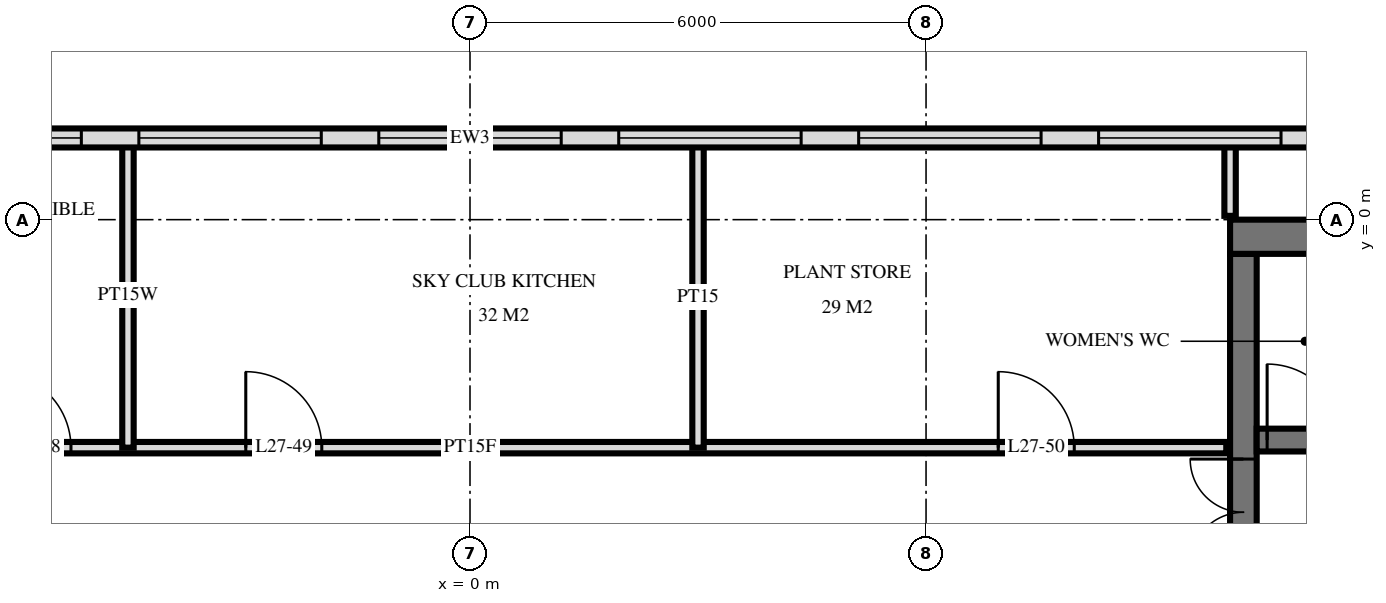
"""IFC4 building model, lengths in metres.
Left out: names, types, materials, properties, quantities, classifications, styles, units other than length and angle.
Written with IfcOpenShell. Run it as: python <this file> out.ifc"""

import sys

from ifc_helpers import new_model, si_unit, direction, frame, frame_2d, origin, place, context, subcontext, project, spatial, rectangle, extrude, element, fill, save


model = new_model("IFC4")
c1 = context("Model", 3, precision=1e-05, world=origin(), true_north=direction((0.0, 1.0)))
c2 = subcontext(c1, "Body", "Model", "MODEL_VIEW")
j1 = project(units=[si_unit("LENGTHUNIT", "METRE"), si_unit("PLANEANGLEUNIT", "RADIAN")], contexts=[c1])
p1 = place(None, origin())
s1 = spatial("IfcSite", under=j1, at=p1, CompositionType="ELEMENT")
p2 = place(p1, origin())
s2 = spatial("IfcBuilding", under=s1, at=p2, CompositionType="ELEMENT")
p3 = place(p2, frame((0.0, 0.0, 106.8)))
s3 = spatial("IfcBuildingStorey", under=s2, at=p3, CompositionType="ELEMENT", Elevation=106.8)
p4 = place(p3, frame((10.0, -0.225, 0.0), z_axis=(0.0, 0.0, 1.0), x_axis=(1.0, 0.0, 0.0)))
e1 = element("IfcWall", 1, at=p4, inside=s3, PredefinedType="SHEAR", context=c2, shape_type="SweptSolid", body=[
    extrude(rectangle(XDim=14.5, YDim=0.45, at=frame_2d((7.25, 0.0))), origin(), (0.0, 0.0, 1.0), 6.0),
])
p5 = place(p3, frame((10.175, -14.55, 0.0), z_axis=(0.0, 0.0, 1.0), x_axis=(0.0, 1.0, 0.0)))
e2 = element("IfcWall", 2, at=p5, inside=s3, PredefinedType="SHEAR", context=c2, shape_type="SweptSolid", body=[
    extrude(rectangle(XDim=14.1, YDim=0.35, at=frame_2d((7.05, 0.0))), origin(), (0.0, 0.0, 1.0), 6.0),
])
p6 = place(p5, frame((8.4, 0.0, 0.0)))
e3 = element("IfcOpeningElement", 3, at=p6, cuts=e2, PredefinedType="OPENING", context=c2, shape_type="SweptSolid", body=[
    extrude(rectangle(XDim=1.4, YDim=2.4, at=frame_2d((0.7, 1.2))), frame((0.0, 0.185, 0.0), z_axis=(0.0, -1.0, 0.0), x_axis=(1.0, 0.0, 0.0)), (0.0, 0.0, 1.0), 0.37),
])
p7 = place(p5, frame((10.0, 0.0, 0.0)))
e4 = element("IfcOpeningElement", 4, at=p7, cuts=e2, PredefinedType="OPENING", context=c2, shape_type="SweptSolid", body=[
    extrude(rectangle(XDim=1.4, YDim=2.4, at=frame_2d((0.7, 1.2))), frame((0.0, 0.185, 0.0), z_axis=(0.0, -1.0, 0.0), x_axis=(1.0, 0.0, 0.0)), (0.0, 0.0, 1.0), 0.37),
])
p8 = place(p5, frame((4.0, 0.0, 0.0)))
e5 = element("IfcOpeningElement", 5, at=p8, cuts=e2, PredefinedType="OPENING", context=c2, shape_type="SweptSolid", body=[
    extrude(rectangle(XDim=1.2, YDim=2.1, at=frame_2d((0.6, 1.05))), frame((0.0, 0.185, 0.0), z_axis=(0.0, -1.0, 0.0), x_axis=(1.0, 0.0, 0.0)), (0.0, 0.0, 1.0), 0.37),
])
p9 = place(p3, frame((10.35, -2.9, 0.0), z_axis=(0.0, 0.0, 1.0), x_axis=(1.0, 0.0, 0.0)))
e6 = element("IfcWall", 6, at=p9, inside=s3, PredefinedType="SHEAR", context=c2, shape_type="SweptSolid", body=[
    extrude(rectangle(XDim=13.7, YDim=0.3, at=frame_2d((6.85, 0.0))), origin(), (0.0, 0.0, 1.0), 6.0),
])
p10 = place(p9, frame((9.65, 0.0, 0.0)))
e7 = element("IfcOpeningElement", 7, at=p10, cuts=e6, PredefinedType="OPENING", context=c2, shape_type="SweptSolid", body=[
    extrude(rectangle(XDim=1.1, YDim=2.1, at=frame_2d((0.55, 1.05))), frame((0.0, 0.16, 0.0), z_axis=(0.0, -1.0, 0.0), x_axis=(1.0, 0.0, 0.0)), (0.0, 0.0, 1.0), 0.32),
])
p11 = place(p9, frame((12.05, 0.0, 0.0)))
e8 = element("IfcOpeningElement", 8, at=p11, cuts=e6, PredefinedType="OPENING", context=c2, shape_type="SweptSolid", body=[
    extrude(rectangle(XDim=1.1, YDim=2.1, at=frame_2d((0.55, 1.05))), frame((0.0, 0.16, 0.0), z_axis=(0.0, -1.0, 0.0), x_axis=(1.0, 0.0, 0.0)), (0.0, 0.0, 1.0), 0.32),
])
p12 = place(p9, frame((6.188, 0.0, 0.0)))
e9 = element("IfcOpeningElement", 9, at=p12, cuts=e6, PredefinedType="OPENING", context=c2, shape_type="SweptSolid", body=[
    extrude(rectangle(XDim=0.9, YDim=2.1, at=frame_2d((0.45, 1.05))), frame((0.0, 0.16, 0.0), z_axis=(0.0, -1.0, 0.0), x_axis=(1.0, 0.0, 0.0)), (0.0, 0.0, 1.0), 0.32),
])
p13 = place(p9, frame((7.613, 0.0, 0.0)))
e10 = element("IfcOpeningElement", 10, at=p13, cuts=e6, PredefinedType="OPENING", context=c2, shape_type="SweptSolid", body=[
    extrude(rectangle(XDim=0.9, YDim=2.1, at=frame_2d((0.45, 1.05))), frame((0.0, 0.16, 0.0), z_axis=(0.0, -1.0, 0.0), x_axis=(1.0, 0.0, 0.0)), (0.0, 0.0, 1.0), 0.32),
])
p14 = place(p9, frame((0.137, 0.0, 0.0)))
e11 = element("IfcOpeningElement", 11, at=p14, cuts=e6, PredefinedType="OPENING", context=c2, shape_type="SweptSolid", body=[
    extrude(rectangle(XDim=1.0, YDim=2.1, at=frame_2d((0.5, 1.05))), frame((0.0, 0.16, 0.0), z_axis=(0.0, -1.0, 0.0), x_axis=(1.0, 0.0, 0.0)), (0.0, 0.0, 1.0), 0.32),
])
p15 = place(p9, frame((1.562, 0.0, 0.0)))
e12 = element("IfcOpeningElement", 12, at=p15, cuts=e6, PredefinedType="OPENING", context=c2, shape_type="SweptSolid", body=[
    extrude(rectangle(XDim=1.0, YDim=2.1, at=frame_2d((0.5, 1.05))), frame((0.0, 0.16, 0.0), z_axis=(0.0, -1.0, 0.0), x_axis=(1.0, 0.0, 0.0)), (0.0, 0.0, 1.0), 0.32),
])
p16 = place(p9, frame((3.85, 0.0, 0.0)))
e13 = element("IfcOpeningElement", 13, at=p16, cuts=e6, PredefinedType="OPENING", context=c2, shape_type="SweptSolid", body=[
    extrude(rectangle(XDim=1.0, YDim=2.1, at=frame_2d((0.5, 1.05))), frame((0.0, 0.16, 0.0), z_axis=(0.0, -1.0, 0.0), x_axis=(1.0, 0.0, 0.0)), (0.0, 0.0, 1.0), 0.32),
])
p17 = place(p3, frame((23.675, 1.075, 0.0), z_axis=(0.0, 0.0, 1.0), x_axis=(-1.0, 0.0, 0.0)))
e14 = element("IfcWall", 14, at=p17, inside=s3, PredefinedType="SOLIDWALL", context=c2, shape_type="SweptSolid", body=[
    extrude(rectangle(XDim=47.351, YDim=0.25, at=frame_2d((23.675, 0.0))), origin(), (0.0, 0.0, 1.0), 5.72),
])
p18 = place(p17, frame((0.378, 0.0, 0.858)))
e15 = element("IfcOpeningElement", 15, at=p18, cuts=e14, PredefinedType="OPENING", context=c2, shape_type="SweptSolid", body=[
    extrude(rectangle(XDim=2.4, YDim=3.6, at=frame_2d((1.2, 1.8))), frame((0.0, 0.135, 0.0), z_axis=(0.0, -1.0, 0.0), x_axis=(1.0, 0.0, 0.0)), (0.0, 0.0, 1.0), 0.27),
])
p19 = place(p17, frame((3.535, 0.0, 0.858)))
e16 = element("IfcOpeningElement", 16, at=p19, cuts=e14, PredefinedType="OPENING", context=c2, shape_type="SweptSolid", body=[
    extrude(rectangle(XDim=2.4, YDim=3.6, at=frame_2d((1.2, 1.8))), frame((0.0, 0.135, 0.0), z_axis=(0.0, -1.0, 0.0), x_axis=(1.0, 0.0, 0.0)), (0.0, 0.0, 1.0), 0.27),
])
p20 = place(p17, frame((6.692, 0.0, 0.858)))
e17 = element("IfcOpeningElement", 17, at=p20, cuts=e14, PredefinedType="OPENING", context=c2, shape_type="SweptSolid", body=[
    extrude(rectangle(XDim=2.4, YDim=3.6, at=frame_2d((1.2, 1.8))), frame((0.0, 0.135, 0.0), z_axis=(0.0, -1.0, 0.0), x_axis=(1.0, 0.0, 0.0)), (0.0, 0.0, 1.0), 0.27),
])
p21 = place(p17, frame((9.848, 0.0, 0.858)))
e18 = element("IfcOpeningElement", 18, at=p21, cuts=e14, PredefinedType="OPENING", context=c2, shape_type="SweptSolid", body=[
    extrude(rectangle(XDim=2.4, YDim=3.6, at=frame_2d((1.2, 1.8))), frame((0.0, 0.135, 0.0), z_axis=(0.0, -1.0, 0.0), x_axis=(1.0, 0.0, 0.0)), (0.0, 0.0, 1.0), 0.27),
])
p22 = place(p17, frame((13.005, 0.0, 0.858)))
e19 = element("IfcOpeningElement", 19, at=p22, cuts=e14, PredefinedType="OPENING", context=c2, shape_type="SweptSolid", body=[
    extrude(rectangle(XDim=2.4, YDim=3.6, at=frame_2d((1.2, 1.8))), frame((0.0, 0.135, 0.0), z_axis=(0.0, -1.0, 0.0), x_axis=(1.0, 0.0, 0.0)), (0.0, 0.0, 1.0), 0.27),
])
p23 = place(p17, frame((16.162, 0.0, 0.858)))
e20 = element("IfcOpeningElement", 20, at=p23, cuts=e14, PredefinedType="OPENING", context=c2, shape_type="SweptSolid", body=[
    extrude(rectangle(XDim=2.4, YDim=3.6, at=frame_2d((1.2, 1.8))), frame((0.0, 0.135, 0.0), z_axis=(0.0, -1.0, 0.0), x_axis=(1.0, 0.0, 0.0)), (0.0, 0.0, 1.0), 0.27),
])
p24 = place(p17, frame((19.319, 0.0, 0.858)))
e21 = element("IfcOpeningElement", 21, at=p24, cuts=e14, PredefinedType="OPENING", context=c2, shape_type="SweptSolid", body=[
    extrude(rectangle(XDim=2.4, YDim=3.6, at=frame_2d((1.2, 1.8))), frame((0.0, 0.135, 0.0), z_axis=(0.0, -1.0, 0.0), x_axis=(1.0, 0.0, 0.0)), (0.0, 0.0, 1.0), 0.27),
])
p25 = place(p17, frame((22.475, 0.0, 0.858)))
e22 = element("IfcOpeningElement", 22, at=p25, cuts=e14, PredefinedType="OPENING", context=c2, shape_type="SweptSolid", body=[
    extrude(rectangle(XDim=2.4, YDim=3.6, at=frame_2d((1.2, 1.8))), frame((0.0, 0.135, 0.0), z_axis=(0.0, -1.0, 0.0), x_axis=(1.0, 0.0, 0.0)), (0.0, 0.0, 1.0), 0.27),
])
p26 = place(p17, frame((25.632, 0.0, 0.858)))
e23 = element("IfcOpeningElement", 23, at=p26, cuts=e14, PredefinedType="OPENING", context=c2, shape_type="SweptSolid", body=[
    extrude(rectangle(XDim=2.4, YDim=3.6, at=frame_2d((1.2, 1.8))), frame((0.0, 0.135, 0.0), z_axis=(0.0, -1.0, 0.0), x_axis=(1.0, 0.0, 0.0)), (0.0, 0.0, 1.0), 0.27),
])
p27 = place(p17, frame((28.789, 0.0, 0.858)))
e24 = element("IfcOpeningElement", 24, at=p27, cuts=e14, PredefinedType="OPENING", context=c2, shape_type="SweptSolid", body=[
    extrude(rectangle(XDim=2.4, YDim=3.6, at=frame_2d((1.2, 1.8))), frame((0.0, 0.135, 0.0), z_axis=(0.0, -1.0, 0.0), x_axis=(1.0, 0.0, 0.0)), (0.0, 0.0, 1.0), 0.27),
])
p28 = place(p17, frame((31.946, 0.0, 0.858)))
e25 = element("IfcOpeningElement", 25, at=p28, cuts=e14, PredefinedType="OPENING", context=c2, shape_type="SweptSolid", body=[
    extrude(rectangle(XDim=2.4, YDim=3.6, at=frame_2d((1.2, 1.8))), frame((0.0, 0.135, 0.0), z_axis=(0.0, -1.0, 0.0), x_axis=(1.0, 0.0, 0.0)), (0.0, 0.0, 1.0), 0.27),
])
p29 = place(p17, frame((35.102, 0.0, 0.858)))
e26 = element("IfcOpeningElement", 26, at=p29, cuts=e14, PredefinedType="OPENING", context=c2, shape_type="SweptSolid", body=[
    extrude(rectangle(XDim=2.4, YDim=3.6, at=frame_2d((1.2, 1.8))), frame((0.0, 0.135, 0.0), z_axis=(0.0, -1.0, 0.0), x_axis=(1.0, 0.0, 0.0)), (0.0, 0.0, 1.0), 0.27),
])
p30 = place(p17, frame((38.259, 0.0, 0.858)))
e27 = element("IfcOpeningElement", 27, at=p30, cuts=e14, PredefinedType="OPENING", context=c2, shape_type="SweptSolid", body=[
    extrude(rectangle(XDim=2.4, YDim=3.6, at=frame_2d((1.2, 1.8))), frame((0.0, 0.135, 0.0), z_axis=(0.0, -1.0, 0.0), x_axis=(1.0, 0.0, 0.0)), (0.0, 0.0, 1.0), 0.27),
])
p31 = place(p17, frame((41.416, 0.0, 0.858)))
e28 = element("IfcOpeningElement", 28, at=p31, cuts=e14, PredefinedType="OPENING", context=c2, shape_type="SweptSolid", body=[
    extrude(rectangle(XDim=2.4, YDim=3.6, at=frame_2d((1.2, 1.8))), frame((0.0, 0.135, 0.0), z_axis=(0.0, -1.0, 0.0), x_axis=(1.0, 0.0, 0.0)), (0.0, 0.0, 1.0), 0.27),
])
p32 = place(p17, frame((44.573, 0.0, 0.858)))
e29 = element("IfcOpeningElement", 29, at=p32, cuts=e14, PredefinedType="OPENING", context=c2, shape_type="SweptSolid", body=[
    extrude(rectangle(XDim=2.4, YDim=3.6, at=frame_2d((1.2, 1.8))), frame((0.0, 0.135, 0.0), z_axis=(0.0, -1.0, 0.0), x_axis=(1.0, 0.0, 0.0)), (0.0, 0.0, 1.0), 0.27),
])
p33 = place(p3, frame((10.0, 0.05, 0.0), z_axis=(0.0, 0.0, 1.0), x_axis=(0.0, 1.0, 0.0)))
e30 = element("IfcWall", 30, at=p33, inside=s3, PredefinedType="PARTITIONING", context=c2, shape_type="SweptSolid", body=[
    extrude(rectangle(XDim=0.91, YDim=0.15, at=frame_2d((0.455, 0.0))), origin(), (0.0, 0.0, 1.0), 5.7),
])
p34 = place(p3, frame((3.0, -3.0, 0.0), z_axis=(0.0, 0.0, 1.0), x_axis=(0.0, 1.0, 0.0)))
e31 = element("IfcWall", 31, at=p34, inside=s3, PredefinedType="PARTITIONING", context=c2, shape_type="SweptSolid", body=[
    extrude(rectangle(XDim=3.96, YDim=0.15, at=frame_2d((1.98, 0.0))), origin(), (0.0, 0.0, 1.0), 5.7),
])
p35 = place(p3, frame((-4.5, -3.0, 0.0), z_axis=(0.0, 0.0, 1.0), x_axis=(0.0, 1.0, 0.0)))
e32 = element("IfcWall", 32, at=p35, inside=s3, PredefinedType="PLUMBINGWALL", context=c2, shape_type="SweptSolid", body=[
    extrude(rectangle(XDim=4.02, YDim=0.15, at=frame_2d((2.01, 0.0))), origin(), (0.0, 0.0, 1.0), 5.7),
])
p36 = place(p3, frame((-9.95, -3.0, 0.0), z_axis=(0.0, 0.0, 1.0), x_axis=(1.0, 0.0, 0.0)))
e33 = element("IfcWall", 33, at=p36, inside=s3, PredefinedType="PARTITIONING", context=c2, shape_type="SweptSolid", body=[
    extrude(rectangle(XDim=19.9, YDim=0.15, at=frame_2d((9.95, 0.0))), origin(), (0.0, 0.0, 1.0), 5.7),
])
p37 = place(p36, frame((0.95, 0.0, 0.0)))
e34 = element("IfcOpeningElement", 34, at=p37, cuts=e33, PredefinedType="OPENING", context=c2, shape_type="SweptSolid", body=[
    extrude(rectangle(XDim=1.0, YDim=2.1, at=frame_2d((0.5, 1.05))), frame((0.0, 0.085, 0.0), z_axis=(0.0, -1.0, 0.0), x_axis=(1.0, 0.0, 0.0)), (0.0, 0.0, 1.0), 0.17),
])
p38 = place(p36, frame((3.7, 0.0, 0.0)))
e35 = element("IfcOpeningElement", 35, at=p38, cuts=e33, PredefinedType="OPENING", context=c2, shape_type="SweptSolid", body=[
    extrude(rectangle(XDim=1.0, YDim=2.1, at=frame_2d((0.5, 1.05))), frame((0.0, 0.085, 0.0), z_axis=(0.0, -1.0, 0.0), x_axis=(1.0, 0.0, 0.0)), (0.0, 0.0, 1.0), 0.17),
])
p39 = place(p36, frame((7.0, 0.0, 0.0)))
e36 = element("IfcOpeningElement", 36, at=p39, cuts=e33, PredefinedType="OPENING", context=c2, shape_type="SweptSolid", body=[
    extrude(rectangle(XDim=1.0, YDim=2.1, at=frame_2d((0.5, 1.05))), frame((0.0, 0.085, 0.0), z_axis=(0.0, -1.0, 0.0), x_axis=(1.0, 0.0, 0.0)), (0.0, 0.0, 1.0), 0.17),
])
p40 = place(p36, frame((16.9, 0.0, 0.0)))
e37 = element("IfcOpeningElement", 37, at=p40, cuts=e33, PredefinedType="OPENING", context=c2, shape_type="SweptSolid", body=[
    extrude(rectangle(XDim=1.0, YDim=2.1, at=frame_2d((0.5, 1.05))), frame((0.0, 0.085, 0.0), z_axis=(0.0, -1.0, 0.0), x_axis=(1.0, 0.0, 0.0)), (0.0, 0.0, 1.0), 0.17),
])
p41 = place(p22, origin())
e38 = element("IfcWindow", 38, at=p41, inside=s3, PartitioningType="SINGLE_PANEL", PredefinedType="USERDEFINED", context=c2, shape_type="SweptSolid", body=[
    extrude(rectangle(XDim=2.4, YDim=3.6, at=frame_2d((1.2, 1.8))), frame((0.0, 0.03, 0.0), z_axis=(0.0, -1.0, 0.0), x_axis=(1.0, 0.0, 0.0)), (0.0, 0.0, 1.0), 0.06),
])
fill(e19, e38)
p42 = place(p23, origin())
e39 = element("IfcWindow", 39, at=p42, inside=s3, PartitioningType="SINGLE_PANEL", PredefinedType="USERDEFINED", context=c2, shape_type="SweptSolid", body=[
    extrude(rectangle(XDim=2.4, YDim=3.6, at=frame_2d((1.2, 1.8))), frame((0.0, 0.03, 0.0), z_axis=(0.0, -1.0, 0.0), x_axis=(1.0, 0.0, 0.0)), (0.0, 0.0, 1.0), 0.06),
])
fill(e20, e39)
p43 = place(p24, origin())
e40 = element("IfcWindow", 40, at=p43, inside=s3, PartitioningType="SINGLE_PANEL", PredefinedType="USERDEFINED", context=c2, shape_type="SweptSolid", body=[
    extrude(rectangle(XDim=2.4, YDim=3.6, at=frame_2d((1.2, 1.8))), frame((0.0, 0.03, 0.0), z_axis=(0.0, -1.0, 0.0), x_axis=(1.0, 0.0, 0.0)), (0.0, 0.0, 1.0), 0.06),
])
fill(e21, e40)
p44 = place(p25, origin())
e41 = element("IfcWindow", 41, at=p44, inside=s3, PartitioningType="SINGLE_PANEL", PredefinedType="USERDEFINED", context=c2, shape_type="SweptSolid", body=[
    extrude(rectangle(XDim=2.4, YDim=3.6, at=frame_2d((1.2, 1.8))), frame((0.0, 0.03, 0.0), z_axis=(0.0, -1.0, 0.0), x_axis=(1.0, 0.0, 0.0)), (0.0, 0.0, 1.0), 0.06),
])
fill(e22, e41)
p45 = place(p26, origin())
e42 = element("IfcWindow", 42, at=p45, inside=s3, PartitioningType="SINGLE_PANEL", PredefinedType="USERDEFINED", context=c2, shape_type="SweptSolid", body=[
    extrude(rectangle(XDim=2.4, YDim=3.6, at=frame_2d((1.2, 1.8))), frame((0.0, 0.03, 0.0), z_axis=(0.0, -1.0, 0.0), x_axis=(1.0, 0.0, 0.0)), (0.0, 0.0, 1.0), 0.06),
])
fill(e23, e42)
p46 = place(p27, origin())
e43 = element("IfcWindow", 43, at=p46, inside=s3, PartitioningType="SINGLE_PANEL", PredefinedType="USERDEFINED", context=c2, shape_type="SweptSolid", body=[
    extrude(rectangle(XDim=2.4, YDim=3.6, at=frame_2d((1.2, 1.8))), frame((0.0, 0.03, 0.0), z_axis=(0.0, -1.0, 0.0), x_axis=(1.0, 0.0, 0.0)), (0.0, 0.0, 1.0), 0.06),
])
fill(e24, e43)
p47 = place(p7, origin())
e44 = element("IfcDoor", 44, at=p47, inside=s3, OperationType="DOUBLE_DOOR_SINGLE_SWING", PredefinedType="DOOR", context=c2, shape_type="SweptSolid", body=[
    extrude(rectangle(XDim=1.4, YDim=2.4, at=frame_2d((0.7, 1.2))), frame((0.0, 0.025, 0.0), z_axis=(0.0, -1.0, 0.0), x_axis=(1.0, 0.0, 0.0)), (0.0, 0.0, 1.0), 0.05),
])
fill(e4, e44)
p48 = place(p14, origin())
e45 = element("IfcDoor", 45, at=p48, inside=s3, OperationType="SINGLE_SWING_RIGHT", PredefinedType="DOOR", context=c2, shape_type="SweptSolid", body=[
    extrude(rectangle(XDim=1.0, YDim=2.1, at=frame_2d((0.5, 1.05))), frame((0.0, 0.025, 0.0), z_axis=(0.0, -1.0, 0.0), x_axis=(1.0, 0.0, 0.0)), (0.0, 0.0, 1.0), 0.05),
])
fill(e11, e45)
p49 = place(p38, origin())
e46 = element("IfcDoor", 46, at=p49, inside=s3, OperationType="SINGLE_SWING_RIGHT", PredefinedType="DOOR", context=c2, shape_type="SweptSolid", body=[
    extrude(rectangle(XDim=1.0, YDim=2.1, at=frame_2d((0.5, 1.05))), frame((0.0, 0.025, 0.0), z_axis=(0.0, -1.0, 0.0), x_axis=(1.0, 0.0, 0.0)), (0.0, 0.0, 1.0), 0.05),
])
fill(e35, e46)
p50 = place(p39, origin())
e47 = element("IfcDoor", 47, at=p50, inside=s3, OperationType="SINGLE_SWING_RIGHT", PredefinedType="DOOR", context=c2, shape_type="SweptSolid", body=[
    extrude(rectangle(XDim=1.0, YDim=2.1, at=frame_2d((0.5, 1.05))), frame((0.0, 0.025, 0.0), z_axis=(0.0, -1.0, 0.0), x_axis=(1.0, 0.0, 0.0)), (0.0, 0.0, 1.0), 0.05),
])
fill(e36, e47)
p51 = place(p40, origin())
e48 = element("IfcDoor", 48, at=p51, inside=s3, OperationType="SINGLE_SWING_RIGHT", PredefinedType="DOOR", context=c2, shape_type="SweptSolid", body=[
    extrude(rectangle(XDim=1.0, YDim=2.1, at=frame_2d((0.5, 1.05))), frame((0.0, 0.025, 0.0), z_axis=(0.0, -1.0, 0.0), x_axis=(1.0, 0.0, 0.0)), (0.0, 0.0, 1.0), 0.05),
])
fill(e37, e48)
save(model, sys.argv[1])
